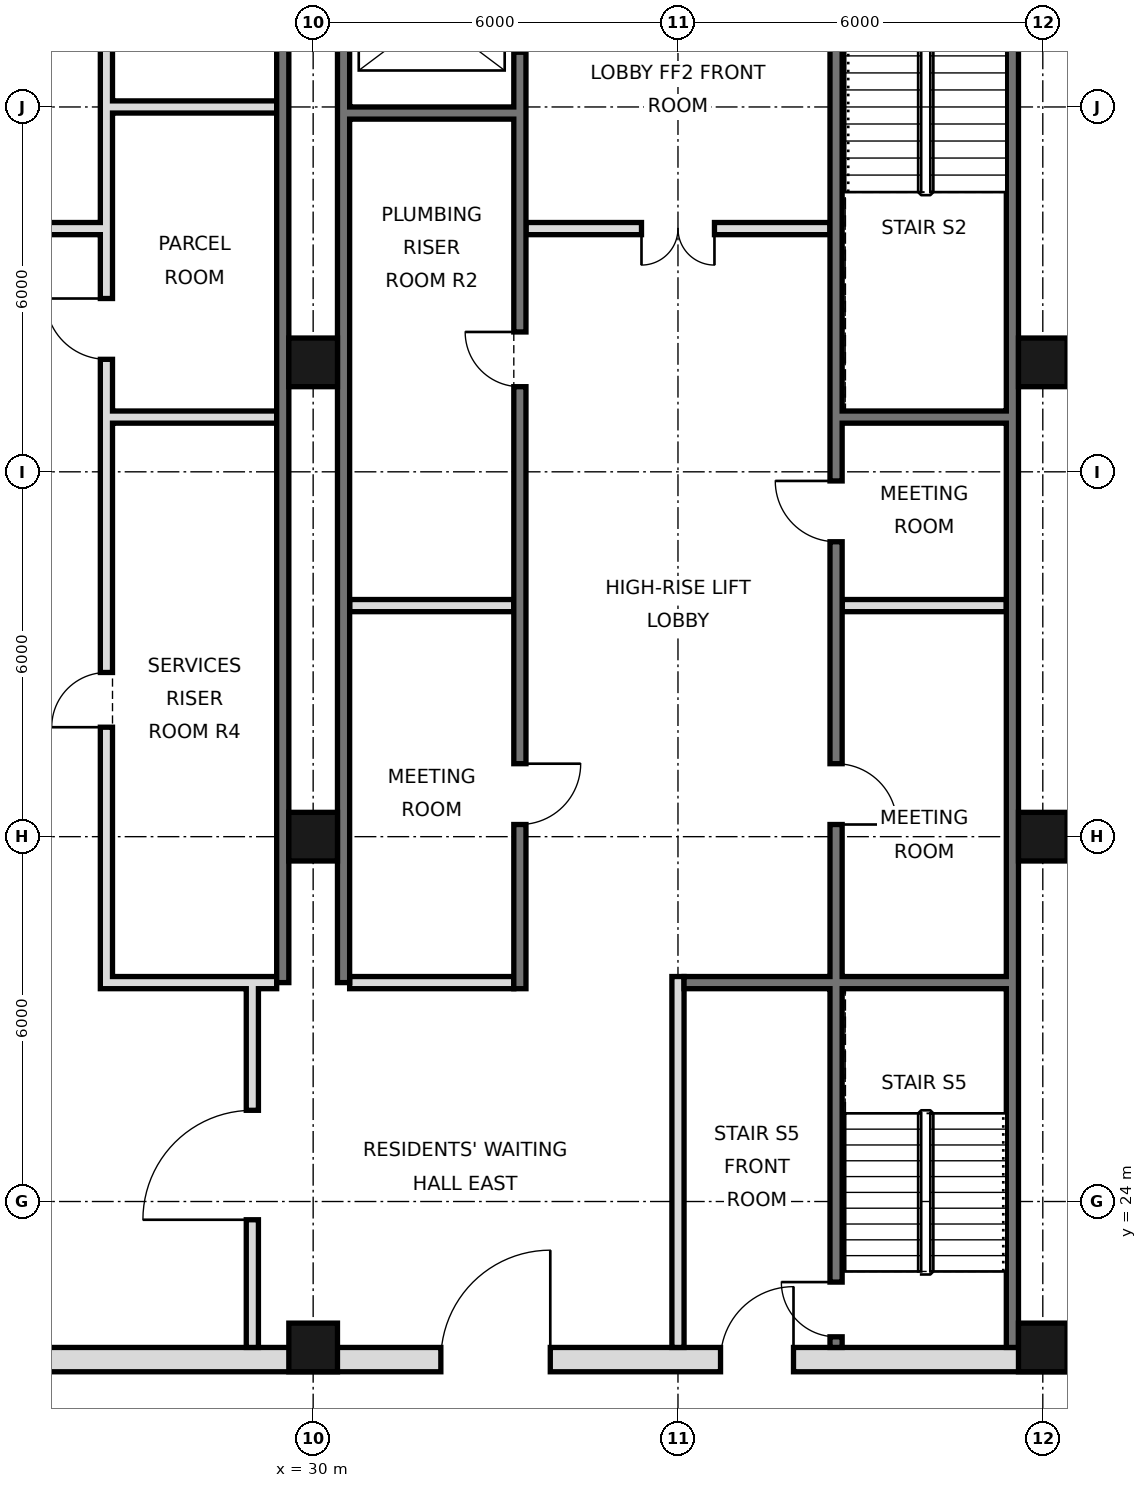
"""IFC4 building model, lengths in metres.
Left out: names, types, materials, properties, quantities, classifications, styles, units other than length and angle.
Written with IfcOpenShell. Run it as: python <this file> out.ifc"""

import sys

from ifc_helpers import new_model, si_unit, direction, frame, frame_2d, origin, origin_2d, place, context, subcontext, project, spatial, rectangle, hollow_rectangle, extrude, element, fill, save


model = new_model("IFC4")
c1 = context("Model", 3, precision=1e-05, world=origin(), true_north=direction((0.0, 1.0)))
c2 = subcontext(c1, "Body", "Model", "MODEL_VIEW")
j1 = project(units=[si_unit("LENGTHUNIT", "METRE"), si_unit("PLANEANGLEUNIT", "RADIAN")], contexts=[c1])
p1 = place(None, origin())
s1 = spatial("IfcSite", under=j1, at=p1, CompositionType="ELEMENT")
p2 = place(p1, origin())
s2 = spatial("IfcBuilding", under=s1, at=p2, CompositionType="ELEMENT")
p3 = place(p2, frame((0.0, 0.0, 126.8)))
s3 = spatial("IfcBuildingStorey", under=s2, at=p3, CompositionType="ELEMENT", Elevation=126.8)
for number, where, z_axis, x_axis in (
    (1, (30.0, 21.6, 0.0), (0.0, 0.0, 1.0), (1.0, 0.0, 0.0)),
    (2, (30.0, 30.0, 0.0), (0.0, 0.0, 1.0), (1.0, 0.0, 0.0)),
    (3, (30.0, 37.8, 0.0), (0.0, 0.0, 1.0), (1.0, 0.0, 0.0)),
    (4, (42.0, 21.6, 0.0), (0.0, 0.0, 1.0), (1.0, 0.0, 0.0)),
    (5, (42.0, 30.0, 0.0), (0.0, 0.0, 1.0), (1.0, 0.0, 0.0)),
    (6, (42.0, 37.8, 0.0), (0.0, 0.0, 1.0), (1.0, 0.0, 0.0)),
):
    element("IfcColumn", number, at=place(p3, frame(where, z_axis=z_axis, x_axis=x_axis)), inside=s3, PredefinedType="COLUMN", context=c2, shape_type="SweptSolid", body=[
        extrude(hollow_rectangle(XDim=0.8, YDim=0.8, WallThickness=0.05, at=origin_2d()), origin(), (0.0, 0.0, 1.0), 3.6),
    ])
p4 = place(p3, frame((41.5, 21.6, 0.0), z_axis=(0.0, 0.0, 1.0), x_axis=(0.0, 1.0, 0.0)))
e7 = element("IfcWall", 7, at=p4, inside=s3, PredefinedType="SOLIDWALL", context=c2, shape_type="SweptSolid", body=[
    extrude(rectangle(XDim=23.5, YDim=0.2, at=frame_2d((11.75, 0.0))), origin(), (0.0, 0.0, 1.0), 3.42),
])
for number, where, z_axis, x_axis in (
    (8, (29.5, 27.6, 0.0), (0.0, 0.0, 1.0), (0.0, 1.0, 0.0)),
    (9, (30.5, 27.6, 0.0), (0.0, 0.0, 1.0), (0.0, 1.0, 0.0)),
):
    element("IfcWall", number, at=place(p3, frame(where, z_axis=z_axis, x_axis=x_axis)), inside=s3, PredefinedType="SOLIDWALL", context=c2, shape_type="SweptSolid", body=[
        extrude(rectangle(XDim=17.5, YDim=0.2, at=frame_2d((8.75, 0.0))), origin(), (0.0, 0.0, 1.0), 3.42),
    ])
p5 = place(p3, frame((5.6, 21.4, 0.0), z_axis=(0.0, 0.0, 1.0), x_axis=(1.0, 0.0, 0.0)))
e10 = element("IfcWall", 10, at=p5, inside=s3, PredefinedType="SOLIDWALL", context=c2, shape_type="SweptSolid", body=[
    extrude(rectangle(XDim=36.8, YDim=0.4, at=frame_2d((18.4, 0.0))), origin(), (0.0, 0.0, 1.0), 3.42),
])
p6 = place(p5, frame((8.5, 0.0, 0.0)))
e11 = element("IfcOpeningElement", 11, at=p6, cuts=e10, PredefinedType="OPENING", context=c2, shape_type="SweptSolid", body=[
    extrude(rectangle(XDim=1.8, YDim=2.1, at=frame_2d((0.9, 1.05))), frame((0.0, 0.21, 0.0), z_axis=(0.0, -1.0, 0.0), x_axis=(1.0, 0.0, 0.0)), (0.0, 0.0, 1.0), 0.42),
])
p7 = place(p5, frame((17.5, 0.0, 0.0)))
e12 = element("IfcOpeningElement", 12, at=p7, cuts=e10, PredefinedType="OPENING", context=c2, shape_type="SweptSolid", body=[
    extrude(rectangle(XDim=1.8, YDim=2.1, at=frame_2d((0.9, 1.05))), frame((0.0, 0.21, 0.0), z_axis=(0.0, -1.0, 0.0), x_axis=(1.0, 0.0, 0.0)), (0.0, 0.0, 1.0), 0.42),
])
p8 = place(p5, frame((26.5, 0.0, 0.0)))
e13 = element("IfcOpeningElement", 13, at=p8, cuts=e10, PredefinedType="OPENING", context=c2, shape_type="SweptSolid", body=[
    extrude(rectangle(XDim=1.8, YDim=2.1, at=frame_2d((0.9, 1.05))), frame((0.0, 0.21, 0.0), z_axis=(0.0, -1.0, 0.0), x_axis=(1.0, 0.0, 0.0)), (0.0, 0.0, 1.0), 0.42),
])
p9 = place(p5, frame((4.5, 0.0, 0.0)))
e14 = element("IfcOpeningElement", 14, at=p9, cuts=e10, PredefinedType="OPENING", context=c2, shape_type="SweptSolid", body=[
    extrude(rectangle(XDim=1.2, YDim=2.1, at=frame_2d((0.6, 1.05))), frame((0.0, 0.21, 0.0), z_axis=(0.0, -1.0, 0.0), x_axis=(1.0, 0.0, 0.0)), (0.0, 0.0, 1.0), 0.42),
])
p10 = place(p5, frame((31.1, 0.0, 0.0)))
e15 = element("IfcOpeningElement", 15, at=p10, cuts=e10, PredefinedType="OPENING", context=c2, shape_type="SweptSolid", body=[
    extrude(rectangle(XDim=1.2, YDim=2.1, at=frame_2d((0.6, 1.05))), frame((0.0, 0.21, 0.0), z_axis=(0.0, -1.0, 0.0), x_axis=(1.0, 0.0, 0.0)), (0.0, 0.0, 1.0), 0.42),
])
p11 = place(p3, frame((29.0, 21.6, 0.0), z_axis=(0.0, 0.0, 1.0), x_axis=(0.0, 1.0, 0.0)))
e16 = element("IfcWall", 16, at=p11, inside=s3, PredefinedType="PARTITIONING", context=c2, shape_type="SweptSolid", body=[
    extrude(rectangle(XDim=6.0, YDim=0.2, at=frame_2d((3.0, 0.0))), origin(), (0.0, 0.0, 1.0), 3.42),
])
p12 = place(p11, frame((2.1, 0.0, 0.0)))
e17 = element("IfcOpeningElement", 17, at=p12, cuts=e16, PredefinedType="OPENING", context=c2, shape_type="SweptSolid", body=[
    extrude(rectangle(XDim=1.8, YDim=2.1, at=frame_2d((0.9, 1.05))), frame((0.0, 0.11, 0.0), z_axis=(0.0, -1.0, 0.0), x_axis=(1.0, 0.0, 0.0)), (0.0, 0.0, 1.0), 0.22),
])
p13 = place(p3, frame((26.6, 27.5, 0.0), z_axis=(0.0, 0.0, 1.0), x_axis=(0.0, 1.0, 0.0)))
e18 = element("IfcWall", 18, at=p13, inside=s3, PredefinedType="SOLIDWALL", context=c2, shape_type="SweptSolid", body=[
    extrude(rectangle(XDim=17.5, YDim=0.2, at=frame_2d((8.75, 0.0))), origin(), (0.0, 0.0, 1.0), 3.42),
])
p14 = place(p13, frame((4.3, 0.0, 0.0)))
e19 = element("IfcOpeningElement", 19, at=p14, cuts=e18, PredefinedType="OPENING", context=c2, shape_type="SweptSolid", body=[
    extrude(rectangle(XDim=0.9, YDim=2.1, at=frame_2d((0.45, 1.05))), frame((0.0, 0.11, 0.0), z_axis=(0.0, -1.0, 0.0), x_axis=(1.0, 0.0, 0.0)), (0.0, 0.0, 1.0), 0.22),
])
p15 = place(p13, frame((10.35, 0.0, 0.0)))
e20 = element("IfcOpeningElement", 20, at=p15, cuts=e18, PredefinedType="OPENING", context=c2, shape_type="SweptSolid", body=[
    extrude(rectangle(XDim=1.0, YDim=2.1, at=frame_2d((0.5, 1.05))), frame((0.0, 0.11, 0.0), z_axis=(0.0, -1.0, 0.0), x_axis=(1.0, 0.0, 0.0)), (0.0, 0.0, 1.0), 0.22),
])
p16 = place(p13, frame((15.475, 0.0, 0.0)))
e21 = element("IfcOpeningElement", 21, at=p16, cuts=e18, PredefinedType="OPENING", context=c2, shape_type="SweptSolid", body=[
    extrude(rectangle(XDim=1.0, YDim=2.1, at=frame_2d((0.5, 1.05))), frame((0.0, 0.11, 0.0), z_axis=(0.0, -1.0, 0.0), x_axis=(1.0, 0.0, 0.0)), (0.0, 0.0, 1.0), 0.22),
])
p17 = place(p3, frame((33.4, 27.5, 0.0), z_axis=(0.0, 0.0, 1.0), x_axis=(0.0, 1.0, 0.0)))
e22 = element("IfcWall", 22, at=p17, inside=s3, PredefinedType="SOLIDWALL", context=c2, shape_type="SweptSolid", body=[
    extrude(rectangle(XDim=17.5, YDim=0.2, at=frame_2d((8.75, 0.0))), origin(), (0.0, 0.0, 1.0), 3.42),
])
p18 = place(p17, frame((15.4, 0.0, 0.0)))
e23 = element("IfcOpeningElement", 23, at=p18, cuts=e22, PredefinedType="OPENING", context=c2, shape_type="SweptSolid", body=[
    extrude(rectangle(XDim=1.1, YDim=2.1, at=frame_2d((0.55, 1.05))), frame((0.0, 0.11, 0.0), z_axis=(0.0, -1.0, 0.0), x_axis=(1.0, 0.0, 0.0)), (0.0, 0.0, 1.0), 0.22),
])
p19 = place(p17, frame((2.7, 0.0, 0.0)))
e24 = element("IfcOpeningElement", 24, at=p19, cuts=e22, PredefinedType="OPENING", context=c2, shape_type="SweptSolid", body=[
    extrude(rectangle(XDim=1.0, YDim=2.1, at=frame_2d((0.5, 1.05))), frame((0.0, 0.11, 0.0), z_axis=(0.0, -1.0, 0.0), x_axis=(1.0, 0.0, 0.0)), (0.0, 0.0, 1.0), 0.22),
])
p20 = place(p17, frame((9.9, 0.0, 0.0)))
e25 = element("IfcOpeningElement", 25, at=p20, cuts=e22, PredefinedType="OPENING", context=c2, shape_type="SweptSolid", body=[
    extrude(rectangle(XDim=0.9, YDim=2.1, at=frame_2d((0.45, 1.05))), frame((0.0, 0.11, 0.0), z_axis=(0.0, -1.0, 0.0), x_axis=(1.0, 0.0, 0.0)), (0.0, 0.0, 1.0), 0.22),
])
p21 = place(p3, frame((36.0, 21.6, 0.0), z_axis=(0.0, 0.0, 1.0), x_axis=(0.0, 1.0, 0.0)))
e26 = element("IfcWall", 26, at=p21, inside=s3, PredefinedType="PARTITIONING", context=c2, shape_type="SweptSolid", body=[
    extrude(rectangle(XDim=6.1, YDim=0.2, at=frame_2d((3.05, 0.0))), origin(), (0.0, 0.0, 1.0), 3.42),
])
p22 = place(p3, frame((38.6, 21.6, 0.0), z_axis=(0.0, 0.0, 1.0), x_axis=(0.0, 1.0, 0.0)))
e27 = element("IfcWall", 27, at=p22, inside=s3, PredefinedType="SOLIDWALL", context=c2, shape_type="SweptSolid", body=[
    extrude(rectangle(XDim=23.4, YDim=0.2, at=frame_2d((11.7, 0.0))), origin(), (0.0, 0.0, 1.0), 3.42),
])
p23 = place(p22, frame((8.6, 0.0, 0.0)))
e28 = element("IfcOpeningElement", 28, at=p23, cuts=e27, PredefinedType="OPENING", context=c2, shape_type="SweptSolid", body=[
    extrude(rectangle(XDim=1.0, YDim=2.1, at=frame_2d((0.5, 1.05))), frame((0.0, 0.11, 0.0), z_axis=(0.0, -1.0, 0.0), x_axis=(1.0, 0.0, 0.0)), (0.0, 0.0, 1.0), 0.22),
])
p24 = place(p22, frame((13.25, 0.0, 0.0)))
e29 = element("IfcOpeningElement", 29, at=p24, cuts=e27, PredefinedType="OPENING", context=c2, shape_type="SweptSolid", body=[
    extrude(rectangle(XDim=1.0, YDim=2.1, at=frame_2d((0.5, 1.05))), frame((0.0, 0.11, 0.0), z_axis=(0.0, -1.0, 0.0), x_axis=(1.0, 0.0, 0.0)), (0.0, 0.0, 1.0), 0.22),
])
p25 = place(p22, frame((22.1, 0.0, 0.0)))
e30 = element("IfcOpeningElement", 30, at=p25, cuts=e27, PredefinedType="OPENING", context=c2, shape_type="SweptSolid", body=[
    extrude(rectangle(XDim=1.0, YDim=2.1, at=frame_2d((0.5, 1.05))), frame((0.0, 0.11, 0.0), z_axis=(0.0, -1.0, 0.0), x_axis=(1.0, 0.0, 0.0)), (0.0, 0.0, 1.0), 0.22),
])
p26 = place(p22, frame((0.175, 0.0, 0.0)))
e31 = element("IfcOpeningElement", 31, at=p26, cuts=e27, PredefinedType="OPENING", context=c2, shape_type="SweptSolid", body=[
    extrude(rectangle(XDim=0.9, YDim=2.1, at=frame_2d((0.45, 1.05))), frame((0.0, 0.11, 0.0), z_axis=(0.0, -1.0, 0.0), x_axis=(1.0, 0.0, 0.0)), (0.0, 0.0, 1.0), 0.22),
])
p27 = place(p3, frame((26.7, 27.6, 0.0), z_axis=(0.0, 0.0, 1.0), x_axis=(1.0, 0.0, 0.0)))
e32 = element("IfcWall", 32, at=p27, inside=s3, PredefinedType="SOLIDWALL", context=c2, shape_type="SweptSolid", body=[
    extrude(rectangle(XDim=2.7, YDim=0.2, at=frame_2d((1.35, 0.0))), origin(), (0.0, 0.0, 1.0), 3.42),
])
p28 = place(p3, frame((30.6, 27.6, 0.0), z_axis=(0.0, 0.0, 1.0), x_axis=(1.0, 0.0, 0.0)))
e33 = element("IfcWall", 33, at=p28, inside=s3, PredefinedType="PARTITIONING", context=c2, shape_type="SweptSolid", body=[
    extrude(rectangle(XDim=2.7, YDim=0.2, at=frame_2d((1.35, 0.0))), origin(), (0.0, 0.0, 1.0), 3.42),
])
p29 = place(p3, frame((36.1, 27.6, 0.0), z_axis=(0.0, 0.0, 1.0), x_axis=(1.0, 0.0, 0.0)))
e34 = element("IfcWall", 34, at=p29, inside=s3, PredefinedType="SOLIDWALL", context=c2, shape_type="SweptSolid", body=[
    extrude(rectangle(XDim=5.3, YDim=0.2, at=frame_2d((2.65, 0.0))), origin(), (0.0, 0.0, 1.0), 3.42),
])
p30 = place(p3, frame((30.6, 33.8, 0.0), z_axis=(0.0, 0.0, 1.0), x_axis=(1.0, 0.0, 0.0)))
e35 = element("IfcWall", 35, at=p30, inside=s3, PredefinedType="SOLIDWALL", context=c2, shape_type="SweptSolid", body=[
    extrude(rectangle(XDim=2.7, YDim=0.2, at=frame_2d((1.35, 0.0))), origin(), (0.0, 0.0, 1.0), 3.42),
])
p31 = place(p3, frame((38.7, 33.8, 0.0), z_axis=(0.0, 0.0, 1.0), x_axis=(1.0, 0.0, 0.0)))
e36 = element("IfcWall", 36, at=p31, inside=s3, PredefinedType="PARTITIONING", context=c2, shape_type="SweptSolid", body=[
    extrude(rectangle(XDim=2.7, YDim=0.2, at=frame_2d((1.35, 0.0))), origin(), (0.0, 0.0, 1.0), 3.42),
])
for number, where, z_axis, x_axis in (
    (37, (26.7, 36.9, 0.0), (0.0, 0.0, 1.0), (1.0, 0.0, 0.0)),
    (38, (38.7, 36.9, 0.0), (0.0, 0.0, 1.0), (1.0, 0.0, 0.0)),
):
    element("IfcWall", number, at=place(p3, frame(where, z_axis=z_axis, x_axis=x_axis)), inside=s3, PredefinedType="SOLIDWALL", context=c2, shape_type="SweptSolid", body=[
        extrude(rectangle(XDim=2.7, YDim=0.2, at=frame_2d((1.35, 0.0))), origin(), (0.0, 0.0, 1.0), 3.42),
    ])
p32 = place(p3, frame((21.5, 40.0, 0.0), z_axis=(0.0, 0.0, 1.0), x_axis=(1.0, 0.0, 0.0)))
e39 = element("IfcWall", 39, at=p32, inside=s3, PredefinedType="PARTITIONING", context=c2, shape_type="SweptSolid", body=[
    extrude(rectangle(XDim=5.0, YDim=0.2, at=frame_2d((2.5, 0.0))), origin(), (0.0, 0.0, 1.0), 3.42),
])
p33 = place(p32, frame((1.9, 0.0, 0.0)))
e40 = element("IfcOpeningElement", 40, at=p33, cuts=e39, PredefinedType="OPENING", context=c2, shape_type="SweptSolid", body=[
    extrude(rectangle(XDim=1.2, YDim=2.1, at=frame_2d((0.6, 1.05))), frame((0.0, 0.11, 0.0), z_axis=(0.0, -1.0, 0.0), x_axis=(1.0, 0.0, 0.0)), (0.0, 0.0, 1.0), 0.22),
])
p34 = place(p3, frame((33.5, 40.0, 0.0), z_axis=(0.0, 0.0, 1.0), x_axis=(1.0, 0.0, 0.0)))
e41 = element("IfcWall", 41, at=p34, inside=s3, PredefinedType="PARTITIONING", context=c2, shape_type="SweptSolid", body=[
    extrude(rectangle(XDim=5.0, YDim=0.2, at=frame_2d((2.5, 0.0))), origin(), (0.0, 0.0, 1.0), 3.42),
])
p35 = place(p34, frame((1.9, 0.0, 0.0)))
e42 = element("IfcOpeningElement", 42, at=p35, cuts=e41, PredefinedType="OPENING", context=c2, shape_type="SweptSolid", body=[
    extrude(rectangle(XDim=1.2, YDim=2.1, at=frame_2d((0.6, 1.05))), frame((0.0, 0.11, 0.0), z_axis=(0.0, -1.0, 0.0), x_axis=(1.0, 0.0, 0.0)), (0.0, 0.0, 1.0), 0.22),
])
p36 = place(p3, frame((30.6, 41.9, 0.0), z_axis=(0.0, 0.0, 1.0), x_axis=(1.0, 0.0, 0.0)))
e43 = element("IfcWall", 43, at=p36, inside=s3, PredefinedType="SOLIDWALL", context=c2, shape_type="SweptSolid", body=[
    extrude(rectangle(XDim=2.7, YDim=0.2, at=frame_2d((1.35, 0.0))), origin(), (0.0, 0.0, 1.0), 3.42),
])
p37 = place(p3, frame((26.7, 42.0, 0.0), z_axis=(0.0, 0.0, 1.0), x_axis=(1.0, 0.0, 0.0)))
e44 = element("IfcWall", 44, at=p37, inside=s3, PredefinedType="PARTITIONING", context=c2, shape_type="SweptSolid", body=[
    extrude(rectangle(XDim=2.7, YDim=0.2, at=frame_2d((1.35, 0.0))), origin(), (0.0, 0.0, 1.0), 3.42),
])
p38 = place(p12, origin())
e45 = element("IfcDoor", 45, at=p38, inside=s3, OperationType="SINGLE_SWING_LEFT", PredefinedType="DOOR", context=c2, shape_type="SweptSolid", body=[
    extrude(rectangle(XDim=1.8, YDim=2.1, at=frame_2d((0.9, 1.05))), frame((0.0, 0.025, 0.0), z_axis=(0.0, -1.0, 0.0), x_axis=(1.0, 0.0, 0.0)), (0.0, 0.0, 1.0), 0.05),
])
fill(e17, e45)
p39 = place(p8, frame((1.8, 0.0, 0.0), z_axis=(0.0, 0.0, 1.0), x_axis=(-1.0, 0.0, 0.0)))
e46 = element("IfcDoor", 46, at=p39, inside=s3, OperationType="SINGLE_SWING_LEFT", PredefinedType="DOOR", context=c2, shape_type="SweptSolid", body=[
    extrude(rectangle(XDim=1.8, YDim=2.1, at=frame_2d((0.9, 1.05))), frame((0.0, 0.025, 0.0), z_axis=(0.0, -1.0, 0.0), x_axis=(1.0, 0.0, 0.0)), (0.0, 0.0, 1.0), 0.05),
])
fill(e13, e46)
p40 = place(p10, frame((1.2, 0.0, 0.0), z_axis=(0.0, 0.0, 1.0), x_axis=(-1.0, 0.0, 0.0)))
e47 = element("IfcDoor", 47, at=p40, inside=s3, OperationType="SINGLE_SWING_LEFT", PredefinedType="DOOR", context=c2, shape_type="SweptSolid", body=[
    extrude(rectangle(XDim=1.2, YDim=2.1, at=frame_2d((0.6, 1.05))), frame((0.0, 0.025, 0.0), z_axis=(0.0, -1.0, 0.0), x_axis=(1.0, 0.0, 0.0)), (0.0, 0.0, 1.0), 0.05),
])
fill(e15, e47)
p41 = place(p35, frame((1.2, 0.0, 0.0), z_axis=(0.0, 0.0, 1.0), x_axis=(-1.0, 0.0, 0.0)))
e48 = element("IfcDoor", 48, at=p41, inside=s3, OperationType="DOUBLE_DOOR_SINGLE_SWING", PredefinedType="DOOR", context=c2, shape_type="SweptSolid", body=[
    extrude(rectangle(XDim=1.2, YDim=2.1, at=frame_2d((0.6, 1.05))), frame((0.0, 0.025, 0.0), z_axis=(0.0, -1.0, 0.0), x_axis=(1.0, 0.0, 0.0)), (0.0, 0.0, 1.0), 0.05),
])
fill(e42, e48)
p42 = place(p23, frame((1.0, 0.0, 0.0), z_axis=(0.0, 0.0, 1.0), x_axis=(-1.0, 0.0, 0.0)))
e49 = element("IfcDoor", 49, at=p42, inside=s3, OperationType="SINGLE_SWING_RIGHT", PredefinedType="DOOR", context=c2, shape_type="SweptSolid", body=[
    extrude(rectangle(XDim=1.0, YDim=2.1, at=frame_2d((0.5, 1.05))), frame((0.0, 0.025, 0.0), z_axis=(0.0, -1.0, 0.0), x_axis=(1.0, 0.0, 0.0)), (0.0, 0.0, 1.0), 0.05),
])
fill(e28, e49)
p43 = place(p24, frame((1.0, 0.0, 0.0), z_axis=(0.0, 0.0, 1.0), x_axis=(-1.0, 0.0, 0.0)))
e50 = element("IfcDoor", 50, at=p43, inside=s3, OperationType="SINGLE_SWING_LEFT", PredefinedType="DOOR", context=c2, shape_type="SweptSolid", body=[
    extrude(rectangle(XDim=1.0, YDim=2.1, at=frame_2d((0.5, 1.05))), frame((0.0, 0.025, 0.0), z_axis=(0.0, -1.0, 0.0), x_axis=(1.0, 0.0, 0.0)), (0.0, 0.0, 1.0), 0.05),
])
fill(e29, e50)
p44 = place(p19, origin())
e51 = element("IfcDoor", 51, at=p44, inside=s3, OperationType="SINGLE_SWING_RIGHT", PredefinedType="DOOR", context=c2, shape_type="SweptSolid", body=[
    extrude(rectangle(XDim=1.0, YDim=2.1, at=frame_2d((0.5, 1.05))), frame((0.0, 0.025, 0.0), z_axis=(0.0, -1.0, 0.0), x_axis=(1.0, 0.0, 0.0)), (0.0, 0.0, 1.0), 0.05),
])
fill(e24, e51)
p45 = place(p26, frame((0.9, 0.0, 0.0), z_axis=(0.0, 0.0, 1.0), x_axis=(-1.0, 0.0, 0.0)))
e52 = element("IfcDoor", 52, at=p45, inside=s3, OperationType="SINGLE_SWING_LEFT", PredefinedType="DOOR", context=c2, shape_type="SweptSolid", body=[
    extrude(rectangle(XDim=0.9, YDim=2.1, at=frame_2d((0.45, 1.05))), frame((0.0, 0.025, 0.0), z_axis=(0.0, -1.0, 0.0), x_axis=(1.0, 0.0, 0.0)), (0.0, 0.0, 1.0), 0.05),
])
fill(e31, e52)
p46 = place(p20, frame((0.9, 0.0, 0.0), z_axis=(0.0, 0.0, 1.0), x_axis=(-1.0, 0.0, 0.0)))
e53 = element("IfcDoor", 53, at=p46, inside=s3, OperationType="SINGLE_SWING_LEFT", PredefinedType="DOOR", context=c2, shape_type="SweptSolid", body=[
    extrude(rectangle(XDim=0.9, YDim=2.1, at=frame_2d((0.45, 1.05))), frame((0.0, 0.025, 0.0), z_axis=(0.0, -1.0, 0.0), x_axis=(1.0, 0.0, 0.0)), (0.0, 0.0, 1.0), 0.05),
])
fill(e25, e53)
p47 = place(p14, origin())
e54 = element("IfcDoor", 54, at=p47, inside=s3, OperationType="SINGLE_SWING_LEFT", PredefinedType="DOOR", context=c2, shape_type="SweptSolid", body=[
    extrude(rectangle(XDim=0.9, YDim=2.1, at=frame_2d((0.45, 1.05))), frame((0.0, 0.025, 0.0), z_axis=(0.0, -1.0, 0.0), x_axis=(1.0, 0.0, 0.0)), (0.0, 0.0, 1.0), 0.05),
])
fill(e19, e54)
p48 = place(p15, frame((1.0, 0.0, 0.0), z_axis=(0.0, 0.0, 1.0), x_axis=(-1.0, 0.0, 0.0)))
e55 = element("IfcDoor", 55, at=p48, inside=s3, OperationType="SINGLE_SWING_LEFT", PredefinedType="DOOR", context=c2, shape_type="SweptSolid", body=[
    extrude(rectangle(XDim=1.0, YDim=2.1, at=frame_2d((0.5, 1.05))), frame((0.0, 0.025, 0.0), z_axis=(0.0, -1.0, 0.0), x_axis=(1.0, 0.0, 0.0)), (0.0, 0.0, 1.0), 0.05),
])
fill(e20, e55)
save(model, sys.argv[1])
